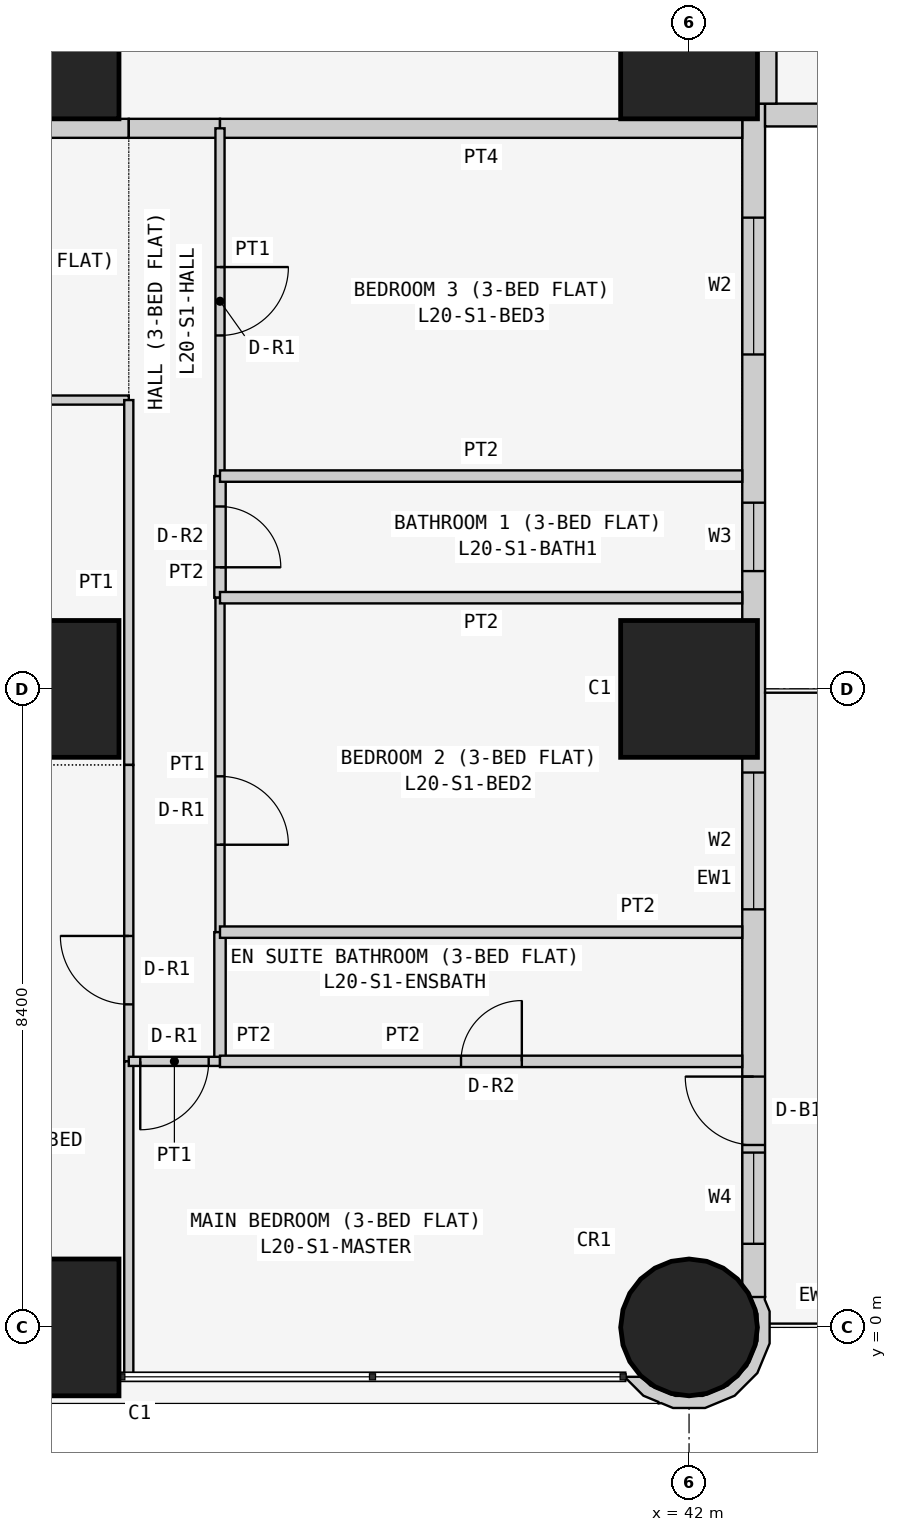
"""IFC4 building model, lengths in metres.
Left out: names, types, materials, properties, quantities, classifications, styles, units other than length and angle.
Written with IfcOpenShell. Run it as: python <this file> out.ifc"""

import sys

from ifc_helpers import new_model, si_unit, direction, frame, frame_2d, origin, origin_2d, place, context, subcontext, project, spatial, polyline, rectangle, circle, outline, extrude, element, fill, save


model = new_model("IFC4")
c1 = context("Model", 3, precision=1e-05, world=origin(), true_north=direction((0.0, 1.0)))
c2 = subcontext(c1, "Body", "Model", "MODEL_VIEW")
j1 = project(units=[si_unit("LENGTHUNIT", "METRE"), si_unit("PLANEANGLEUNIT", "RADIAN")], contexts=[c1])
p1 = place(None, origin())
s1 = spatial("IfcSite", under=j1, at=p1, CompositionType="ELEMENT")
p2 = place(p1, origin())
s2 = spatial("IfcBuilding", under=s1, at=p2, CompositionType="ELEMENT")
p3 = place(p2, frame((0.0, 0.0, 81.3)))
s3 = spatial("IfcBuildingStorey", under=s2, at=p3, CompositionType="ELEMENT", Elevation=81.3)
for number, where, z_axis, x_axis in (
    (1, (33.6, 0.0, 0.0), (0.0, 0.0, 1.0), (1.0, 0.0, 0.0)),
    (2, (33.6, 8.4, 0.0), (0.0, 0.0, 1.0), (1.0, 0.0, 0.0)),
    (3, (33.6, 16.8, 0.0), (0.0, 0.0, 1.0), (1.0, 0.0, 0.0)),
):
    element("IfcColumn", number, at=place(p3, frame(where, z_axis=z_axis, x_axis=x_axis)), inside=s3, PredefinedType="COLUMN", context=c2, shape_type="SweptSolid", body=[
        extrude(rectangle(XDim=1.8, YDim=1.8, at=origin_2d()), origin(), (0.0, 0.0, 1.0), 3.6),
    ])
p4 = place(p3, frame((42.0, 0.0, 0.0), z_axis=(0.0, 0.0, 1.0), x_axis=(1.0, 0.0, 0.0)))
e4 = element("IfcColumn", 4, at=p4, inside=s3, PredefinedType="COLUMN", context=c2, shape_type="SweptSolid", body=[
    extrude(circle(Radius=0.9, at=origin_2d()), origin(), (0.0, 0.0, 1.0), 3.6),
])
for number, where, z_axis, x_axis in (
    (5, (42.0, 8.4, 0.0), (0.0, 0.0, 1.0), (1.0, 0.0, 0.0)),
    (6, (42.0, 16.8, 0.0), (0.0, 0.0, 1.0), (1.0, 0.0, 0.0)),
):
    element("IfcColumn", number, at=place(p3, frame(where, z_axis=z_axis, x_axis=x_axis)), inside=s3, PredefinedType="COLUMN", context=c2, shape_type="SweptSolid", body=[
        extrude(rectangle(XDim=1.8, YDim=1.8, at=origin_2d()), origin(), (0.0, 0.0, 1.0), 3.6),
    ])
p5 = place(p3, frame((42.85, 0.4, 0.0), z_axis=(0.0, 0.0, 1.0), x_axis=(0.0, 1.0, 0.0)))
e7 = element("IfcWall", 7, at=p5, inside=s3, PredefinedType="SOLIDWALL", context=c2, shape_type="SweptSolid", body=[
    extrude(rectangle(XDim=15.7, YDim=0.3, at=frame_2d((7.85, 0.0))), origin(), (0.0, 0.0, 1.0), 3.45),
])
p6 = place(p5, frame((12.4, 0.0, 0.9)))
e8 = element("IfcOpeningElement", 8, at=p6, cuts=e7, PredefinedType="OPENING", context=c2, shape_type="SweptSolid", body=[
    extrude(rectangle(XDim=1.8, YDim=1.5, at=frame_2d((0.9, 0.75))), frame((0.0, 0.16, 0.0), z_axis=(0.0, -1.0, 0.0), x_axis=(1.0, 0.0, 0.0)), (0.0, 0.0, 1.0), 0.32),
])
p7 = place(p5, frame((9.55, 0.0, 1.5)))
e9 = element("IfcOpeningElement", 9, at=p7, cuts=e7, PredefinedType="OPENING", context=c2, shape_type="SweptSolid", body=[
    extrude(rectangle(XDim=0.9, YDim=0.7, at=frame_2d((0.45, 0.35))), frame((0.0, 0.16, 0.0), z_axis=(0.0, -1.0, 0.0), x_axis=(1.0, 0.0, 0.0)), (0.0, 0.0, 1.0), 0.32),
])
p8 = place(p5, frame((5.1, 0.0, 0.9)))
e10 = element("IfcOpeningElement", 10, at=p8, cuts=e7, PredefinedType="OPENING", context=c2, shape_type="SweptSolid", body=[
    extrude(rectangle(XDim=1.8, YDim=1.5, at=frame_2d((0.9, 0.75))), frame((0.0, 0.16, 0.0), z_axis=(0.0, -1.0, 0.0), x_axis=(1.0, 0.0, 0.0)), (0.0, 0.0, 1.0), 0.32),
])
p9 = place(p5, frame((2.0, 0.0, 0.0)))
e11 = element("IfcOpeningElement", 11, at=p9, cuts=e7, PredefinedType="OPENING", context=c2, shape_type="SweptSolid", body=[
    extrude(rectangle(XDim=0.9, YDim=2.4, at=frame_2d((0.45, 1.2))), frame((0.0, 0.16, 0.0), z_axis=(0.0, -1.0, 0.0), x_axis=(1.0, 0.0, 0.0)), (0.0, 0.0, 1.0), 0.32),
])
p10 = place(p5, frame((0.7, 0.0, 0.9)))
e12 = element("IfcOpeningElement", 12, at=p10, cuts=e7, PredefinedType="OPENING", context=c2, shape_type="SweptSolid", body=[
    extrude(rectangle(XDim=1.2, YDim=1.5, at=frame_2d((0.6, 0.75))), frame((0.0, 0.16, 0.0), z_axis=(0.0, -1.0, 0.0), x_axis=(1.0, 0.0, 0.0)), (0.0, 0.0, 1.0), 0.32),
])
p11 = place(p3, frame((43.0, 15.95, 0.0), z_axis=(0.0, 0.0, 1.0), x_axis=(1.0, 0.0, 0.0)))
e13 = element("IfcWall", 13, at=p11, inside=s3, PredefinedType="SOLIDWALL", context=c2, shape_type="SweptSolid", body=[
    extrude(rectangle(XDim=15.4, YDim=0.3, at=frame_2d((7.7, 0.0))), origin(), (0.0, 0.0, 1.0), 3.45),
])
p12 = place(p11, frame((1.2, 0.0, 0.9)))
e14 = element("IfcOpeningElement", 14, at=p12, cuts=e13, PredefinedType="OPENING", context=c2, shape_type="SweptSolid", body=[
    extrude(rectangle(XDim=1.8, YDim=1.5, at=frame_2d((0.9, 0.75))), frame((0.0, 0.16, 0.0), z_axis=(0.0, -1.0, 0.0), x_axis=(1.0, 0.0, 0.0)), (0.0, 0.0, 1.0), 0.32),
])
p13 = place(p11, frame((4.95, 0.0, 1.5)))
e15 = element("IfcOpeningElement", 15, at=p13, cuts=e13, PredefinedType="OPENING", context=c2, shape_type="SweptSolid", body=[
    extrude(rectangle(XDim=0.9, YDim=0.7, at=frame_2d((0.45, 0.35))), frame((0.0, 0.16, 0.0), z_axis=(0.0, -1.0, 0.0), x_axis=(1.0, 0.0, 0.0)), (0.0, 0.0, 1.0), 0.32),
])
p14 = place(p11, frame((8.5, 0.0, 0.9)))
e16 = element("IfcOpeningElement", 16, at=p14, cuts=e13, PredefinedType="OPENING", context=c2, shape_type="SweptSolid", body=[
    extrude(rectangle(XDim=1.8, YDim=1.5, at=frame_2d((0.9, 0.75))), frame((0.0, 0.16, 0.0), z_axis=(0.0, -1.0, 0.0), x_axis=(1.0, 0.0, 0.0)), (0.0, 0.0, 1.0), 0.32),
])
p15 = place(p11, frame((12.5, 0.0, 0.0)))
e17 = element("IfcOpeningElement", 17, at=p15, cuts=e13, PredefinedType="OPENING", context=c2, shape_type="SweptSolid", body=[
    extrude(rectangle(XDim=0.9, YDim=2.4, at=frame_2d((0.45, 1.2))), frame((0.0, 0.16, 0.0), z_axis=(0.0, -1.0, 0.0), x_axis=(1.0, 0.0, 0.0)), (0.0, 0.0, 1.0), 0.32),
])
p16 = place(p11, frame((13.5, 0.0, 0.9)))
e18 = element("IfcOpeningElement", 18, at=p16, cuts=e13, PredefinedType="OPENING", context=c2, shape_type="SweptSolid", body=[
    extrude(rectangle(XDim=1.2, YDim=1.5, at=frame_2d((0.6, 0.75))), frame((0.0, 0.16, 0.0), z_axis=(0.0, -1.0, 0.0), x_axis=(1.0, 0.0, 0.0)), (0.0, 0.0, 1.0), 0.32),
])
p17 = place(p3, frame((41.233, -0.611, 0.0), z_axis=(0.0, 0.0, 1.0), x_axis=(0.377204953059, -0.926129809145, 0.0)))
e19 = element("IfcWall", 19, at=p17, inside=s3, PredefinedType="SOLIDWALL", context=c2, shape_type="SweptSolid", body=[
    extrude(outline(polyline([(0.319, 1.843), (-0.072, 2.001), (-0.24, 2.001), (-0.269, 2.017), (-0.37, 1.841), (-0.102, 1.842), (0.23, 1.707), (0.485, 1.455), (0.624, 1.125), (0.626, 0.766), (0.49, 0.434), (0.239, 0.179), (0.09, 0.117), (0.011, -0.078), (0.024, -0.083), (0.33, 0.045), (0.48, 0.197), (0.499, 0.193), (0.508, 0.225), (0.626, 0.345), (0.785, 0.736), (0.782, 1.157), (0.619, 1.546), (0.319, 1.843)])), origin(), (0.0, 0.0, 1.0), 3.45),
])
p18 = place(p3, frame((43.025, 22.971, 0.0), z_axis=(0.0, 0.0, 1.0), x_axis=(0.0, -1.0, 0.0)))
e20 = element("IfcWall", 20, at=p18, inside=s3, PredefinedType="PARTITIONING", context=c2, shape_type="SweptSolid", body=[
    extrude(rectangle(XDim=6.871, YDim=0.25, at=frame_2d((3.436, 0.0))), origin(), (0.0, 0.0, 1.0), 3.45),
])
p19 = place(p3, frame((34.629, 15.775, 0.0), z_axis=(0.0, 0.0, 1.0), x_axis=(-1.0, 0.0, 0.0)))
e21 = element("IfcWall", 21, at=p19, inside=s3, PredefinedType="PARTITIONING", context=c2, shape_type="SweptSolid", body=[
    extrude(rectangle(XDim=5.229, YDim=0.25, at=frame_2d((2.615, 0.0))), origin(), (0.0, 0.0, 1.0), 3.45),
])
p20 = place(p19, frame((2.129, 0.0, 0.0)))
e22 = element("IfcOpeningElement", 22, at=p20, cuts=e21, PredefinedType="OPENING", context=c2, shape_type="SweptSolid", body=[
    extrude(rectangle(XDim=1.0, YDim=2.1, at=frame_2d((0.5, 1.05))), frame((0.0, 0.135, 0.0), z_axis=(0.0, -1.0, 0.0), x_axis=(1.0, 0.0, 0.0)), (0.0, 0.0, 1.0), 0.27),
])
p21 = place(p3, frame((35.829, 15.775, 0.0), z_axis=(0.0, 0.0, 1.0), x_axis=(-1.0, 0.0, 0.0)))
e23 = element("IfcWall", 23, at=p21, inside=s3, PredefinedType="PARTITIONING", context=c2, shape_type="SweptSolid", body=[
    extrude(rectangle(XDim=1.2, YDim=0.25, at=frame_2d((0.6, 0.0))), origin(), (0.0, 0.0, 1.0), 3.45),
])
p22 = place(p3, frame((42.7, 15.775, 0.0), z_axis=(0.0, 0.0, 1.0), x_axis=(-1.0, 0.0, 0.0)))
e24 = element("IfcWall", 24, at=p22, inside=s3, PredefinedType="PARTITIONING", context=c2, shape_type="SweptSolid", body=[
    extrude(rectangle(XDim=6.871, YDim=0.25, at=frame_2d((3.436, 0.0))), origin(), (0.0, 0.0, 1.0), 3.45),
])
p23 = place(p3, frame((29.4, 12.2, 0.0), z_axis=(0.0, 0.0, 1.0), x_axis=(1.0, 0.0, 0.0)))
e25 = element("IfcWall", 25, at=p23, inside=s3, PredefinedType="PARTITIONING", context=c2, shape_type="SweptSolid", body=[
    extrude(rectangle(XDim=5.229, YDim=0.12, at=frame_2d((2.615, 0.0))), origin(), (0.0, 0.0, 1.0), 3.45),
])
p24 = place(p23, frame((1.05, 0.0, 0.0)))
e26 = element("IfcOpeningElement", 26, at=p24, cuts=e25, PredefinedType="OPENING", context=c2, shape_type="SweptSolid", body=[
    extrude(rectangle(XDim=0.9, YDim=2.1, at=frame_2d((0.45, 1.05))), frame((0.0, 0.07, 0.0), z_axis=(0.0, -1.0, 0.0), x_axis=(1.0, 0.0, 0.0)), (0.0, 0.0, 1.0), 0.14),
])
p25 = place(p3, frame((34.629, 7.4, 0.0), z_axis=(0.0, 0.0, 1.0), x_axis=(0.0, 1.0, 0.0)))
e27 = element("IfcWall", 27, at=p25, inside=s3, PredefinedType="PARTITIONING", context=c2, shape_type="SweptSolid", body=[
    extrude(rectangle(XDim=4.8, YDim=0.12, at=frame_2d((2.4, 0.0))), origin(), (0.0, 0.0, 1.0), 3.45),
])
p26 = place(p3, frame((34.629, 3.5, 0.0), z_axis=(0.0, 0.0, 1.0), x_axis=(0.0, 1.0, 0.0)))
e28 = element("IfcWall", 28, at=p26, inside=s3, PredefinedType="PARTITIONING", context=c2, shape_type="SweptSolid", body=[
    extrude(rectangle(XDim=3.9, YDim=0.12, at=frame_2d((1.95, 0.0))), origin(), (0.0, 0.0, 1.0), 3.45),
])
p27 = place(p26, frame((0.75, 0.0, 0.0)))
e29 = element("IfcOpeningElement", 29, at=p27, cuts=e28, PredefinedType="OPENING", context=c2, shape_type="SweptSolid", body=[
    extrude(rectangle(XDim=0.9, YDim=2.1, at=frame_2d((0.45, 1.05))), frame((0.0, 0.07, 0.0), z_axis=(0.0, -1.0, 0.0), x_axis=(1.0, 0.0, 0.0)), (0.0, 0.0, 1.0), 0.14),
])
p28 = place(p3, frame((34.629, -0.65, 0.0), z_axis=(0.0, 0.0, 1.0), x_axis=(0.0, 1.0, 0.0)))
e30 = element("IfcWall", 30, at=p28, inside=s3, PredefinedType="PARTITIONING", context=c2, shape_type="SweptSolid", body=[
    extrude(rectangle(XDim=4.15, YDim=0.12, at=frame_2d((2.075, 0.0))), origin(), (0.0, 0.0, 1.0), 3.45),
])
p29 = place(p3, frame((35.829, 11.2, 0.0), z_axis=(0.0, 0.0, 1.0), x_axis=(0.0, 1.0, 0.0)))
e31 = element("IfcWall", 31, at=p29, inside=s3, PredefinedType="PARTITIONING", context=c2, shape_type="SweptSolid", body=[
    extrude(rectangle(XDim=4.575, YDim=0.12, at=frame_2d((2.288, 0.0))), origin(), (0.0, 0.0, 1.0), 3.45),
])
p30 = place(p29, frame((1.85, 0.0, 0.0)))
e32 = element("IfcOpeningElement", 32, at=p30, cuts=e31, PredefinedType="OPENING", context=c2, shape_type="SweptSolid", body=[
    extrude(rectangle(XDim=0.9, YDim=2.1, at=frame_2d((0.45, 1.05))), frame((0.0, 0.07, 0.0), z_axis=(0.0, -1.0, 0.0), x_axis=(1.0, 0.0, 0.0)), (0.0, 0.0, 1.0), 0.14),
])
p31 = place(p3, frame((35.829, 9.6, 0.0), z_axis=(0.0, 0.0, 1.0), x_axis=(0.0, 1.0, 0.0)))
e33 = element("IfcWall", 33, at=p31, inside=s3, PredefinedType="PARTITIONING", context=c2, shape_type="SweptSolid", body=[
    extrude(rectangle(XDim=1.6, YDim=0.15, at=frame_2d((0.8, 0.0))), origin(), (0.0, 0.0, 1.0), 3.45),
])
p32 = place(p31, frame((0.4, 0.0, 0.0)))
e34 = element("IfcOpeningElement", 34, at=p32, cuts=e33, PredefinedType="OPENING", context=c2, shape_type="SweptSolid", body=[
    extrude(rectangle(XDim=0.8, YDim=2.1, at=frame_2d((0.4, 1.05))), frame((0.0, 0.085, 0.0), z_axis=(0.0, -1.0, 0.0), x_axis=(1.0, 0.0, 0.0)), (0.0, 0.0, 1.0), 0.17),
])
p33 = place(p3, frame((35.829, 5.2, 0.0), z_axis=(0.0, 0.0, 1.0), x_axis=(0.0, 1.0, 0.0)))
e35 = element("IfcWall", 35, at=p33, inside=s3, PredefinedType="PARTITIONING", context=c2, shape_type="SweptSolid", body=[
    extrude(rectangle(XDim=4.4, YDim=0.12, at=frame_2d((2.2, 0.0))), origin(), (0.0, 0.0, 1.0), 3.45),
])
p34 = place(p33, frame((1.15, 0.0, 0.0)))
e36 = element("IfcOpeningElement", 36, at=p34, cuts=e35, PredefinedType="OPENING", context=c2, shape_type="SweptSolid", body=[
    extrude(rectangle(XDim=0.9, YDim=2.1, at=frame_2d((0.45, 1.05))), frame((0.0, 0.07, 0.0), z_axis=(0.0, -1.0, 0.0), x_axis=(1.0, 0.0, 0.0)), (0.0, 0.0, 1.0), 0.14),
])
p35 = place(p3, frame((35.829, 3.5, 0.0), z_axis=(0.0, 0.0, 1.0), x_axis=(0.0, 1.0, 0.0)))
e37 = element("IfcWall", 37, at=p35, inside=s3, PredefinedType="PARTITIONING", context=c2, shape_type="SweptSolid", body=[
    extrude(rectangle(XDim=1.7, YDim=0.15, at=frame_2d((0.85, 0.0))), origin(), (0.0, 0.0, 1.0), 3.45),
])
p36 = place(p3, frame((34.629, 3.5, 0.0), z_axis=(0.0, 0.0, 1.0), x_axis=(1.0, 0.0, 0.0)))
e38 = element("IfcWall", 38, at=p36, inside=s3, PredefinedType="PARTITIONING", context=c2, shape_type="SweptSolid", body=[
    extrude(rectangle(XDim=1.2, YDim=0.12, at=frame_2d((0.6, 0.0))), origin(), (0.0, 0.0, 1.0), 3.45),
])
p37 = place(p36, frame((0.151, 0.0, 0.0)))
e39 = element("IfcOpeningElement", 39, at=p37, cuts=e38, PredefinedType="OPENING", context=c2, shape_type="SweptSolid", body=[
    extrude(rectangle(XDim=0.9, YDim=2.1, at=frame_2d((0.45, 1.05))), frame((0.0, 0.07, 0.0), z_axis=(0.0, -1.0, 0.0), x_axis=(1.0, 0.0, 0.0)), (0.0, 0.0, 1.0), 0.14),
])
for number, where, z_axis, x_axis in (
    (40, (35.829, 11.2, 0.0), (0.0, 0.0, 1.0), (1.0, 0.0, 0.0)),
    (41, (35.829, 9.6, 0.0), (0.0, 0.0, 1.0), (1.0, 0.0, 0.0)),
    (42, (35.829, 5.2, 0.0), (0.0, 0.0, 1.0), (1.0, 0.0, 0.0)),
):
    element("IfcWall", number, at=place(p3, frame(where, z_axis=z_axis, x_axis=x_axis)), inside=s3, PredefinedType="PARTITIONING", context=c2, shape_type="SweptSolid", body=[
        extrude(rectangle(XDim=6.871, YDim=0.15, at=frame_2d((3.436, 0.0))), origin(), (0.0, 0.0, 1.0), 3.45),
    ])
p38 = place(p3, frame((35.829, 3.5, 0.0), z_axis=(0.0, 0.0, 1.0), x_axis=(1.0, 0.0, 0.0)))
e43 = element("IfcWall", 43, at=p38, inside=s3, PredefinedType="PARTITIONING", context=c2, shape_type="SweptSolid", body=[
    extrude(rectangle(XDim=6.871, YDim=0.15, at=frame_2d((3.436, 0.0))), origin(), (0.0, 0.0, 1.0), 3.45),
])
p39 = place(p38, frame((3.171, 0.0, 0.0)))
e44 = element("IfcOpeningElement", 44, at=p39, cuts=e43, PredefinedType="OPENING", context=c2, shape_type="SweptSolid", body=[
    extrude(rectangle(XDim=0.8, YDim=2.1, at=frame_2d((0.4, 1.05))), frame((0.0, 0.085, 0.0), z_axis=(0.0, -1.0, 0.0), x_axis=(1.0, 0.0, 0.0)), (0.0, 0.0, 1.0), 0.17),
])
p40 = place(p6, origin())
e45 = element("IfcWindow", 45, at=p40, inside=s3, PartitioningType="SINGLE_PANEL", PredefinedType="WINDOW", context=c2, shape_type="SweptSolid", body=[
    extrude(rectangle(XDim=1.8, YDim=1.5, at=frame_2d((0.9, 0.75))), frame((0.0, 0.03, 0.0), z_axis=(0.0, -1.0, 0.0), x_axis=(1.0, 0.0, 0.0)), (0.0, 0.0, 1.0), 0.06),
])
fill(e8, e45)
p41 = place(p7, origin())
e46 = element("IfcWindow", 46, at=p41, inside=s3, PartitioningType="SINGLE_PANEL", PredefinedType="WINDOW", context=c2, shape_type="SweptSolid", body=[
    extrude(rectangle(XDim=0.9, YDim=0.7, at=frame_2d((0.45, 0.35))), frame((0.0, 0.03, 0.0), z_axis=(0.0, -1.0, 0.0), x_axis=(1.0, 0.0, 0.0)), (0.0, 0.0, 1.0), 0.06),
])
fill(e9, e46)
p42 = place(p8, origin())
e47 = element("IfcWindow", 47, at=p42, inside=s3, PartitioningType="SINGLE_PANEL", PredefinedType="WINDOW", context=c2, shape_type="SweptSolid", body=[
    extrude(rectangle(XDim=1.8, YDim=1.5, at=frame_2d((0.9, 0.75))), frame((0.0, 0.03, 0.0), z_axis=(0.0, -1.0, 0.0), x_axis=(1.0, 0.0, 0.0)), (0.0, 0.0, 1.0), 0.06),
])
fill(e10, e47)
p43 = place(p9, origin())
e48 = element("IfcDoor", 48, at=p43, inside=s3, OperationType="SINGLE_SWING_RIGHT", PredefinedType="DOOR", context=c2, shape_type="SweptSolid", body=[
    extrude(rectangle(XDim=0.9, YDim=2.4, at=frame_2d((0.45, 1.2))), frame((0.0, 0.025, 0.0), z_axis=(0.0, -1.0, 0.0), x_axis=(1.0, 0.0, 0.0)), (0.0, 0.0, 1.0), 0.05),
])
fill(e11, e48)
p44 = place(p10, origin())
e49 = element("IfcWindow", 49, at=p44, inside=s3, PartitioningType="SINGLE_PANEL", PredefinedType="WINDOW", context=c2, shape_type="SweptSolid", body=[
    extrude(rectangle(XDim=1.2, YDim=1.5, at=frame_2d((0.6, 0.75))), frame((0.0, 0.03, 0.0), z_axis=(0.0, -1.0, 0.0), x_axis=(1.0, 0.0, 0.0)), (0.0, 0.0, 1.0), 0.06),
])
fill(e12, e49)
p45 = place(p27, origin())
e50 = element("IfcDoor", 50, at=p45, inside=s3, OperationType="SINGLE_SWING_RIGHT", PredefinedType="DOOR", context=c2, shape_type="SweptSolid", body=[
    extrude(rectangle(XDim=0.9, YDim=2.1, at=frame_2d((0.45, 1.05))), frame((0.0, 0.025, 0.0), z_axis=(0.0, -1.0, 0.0), x_axis=(1.0, 0.0, 0.0)), (0.0, 0.0, 1.0), 0.05),
])
fill(e29, e50)
p46 = place(p30, frame((0.9, 0.0, 0.0), z_axis=(0.0, 0.0, 1.0), x_axis=(-1.0, 0.0, 0.0)))
e51 = element("IfcDoor", 51, at=p46, inside=s3, OperationType="SINGLE_SWING_LEFT", PredefinedType="DOOR", context=c2, shape_type="SweptSolid", body=[
    extrude(rectangle(XDim=0.9, YDim=2.1, at=frame_2d((0.45, 1.05))), frame((0.0, 0.025, 0.0), z_axis=(0.0, -1.0, 0.0), x_axis=(1.0, 0.0, 0.0)), (0.0, 0.0, 1.0), 0.05),
])
fill(e32, e51)
p47 = place(p32, frame((0.8, 0.0, 0.0), z_axis=(0.0, 0.0, 1.0), x_axis=(-1.0, 0.0, 0.0)))
e52 = element("IfcDoor", 52, at=p47, inside=s3, OperationType="SINGLE_SWING_RIGHT", PredefinedType="DOOR", context=c2, shape_type="SweptSolid", body=[
    extrude(rectangle(XDim=0.8, YDim=2.1, at=frame_2d((0.4, 1.05))), frame((0.0, 0.025, 0.0), z_axis=(0.0, -1.0, 0.0), x_axis=(1.0, 0.0, 0.0)), (0.0, 0.0, 1.0), 0.05),
])
fill(e34, e52)
p48 = place(p34, frame((0.9, 0.0, 0.0), z_axis=(0.0, 0.0, 1.0), x_axis=(-1.0, 0.0, 0.0)))
e53 = element("IfcDoor", 53, at=p48, inside=s3, OperationType="SINGLE_SWING_RIGHT", PredefinedType="DOOR", context=c2, shape_type="SweptSolid", body=[
    extrude(rectangle(XDim=0.9, YDim=2.1, at=frame_2d((0.45, 1.05))), frame((0.0, 0.025, 0.0), z_axis=(0.0, -1.0, 0.0), x_axis=(1.0, 0.0, 0.0)), (0.0, 0.0, 1.0), 0.05),
])
fill(e36, e53)
p49 = place(p37, frame((0.9, 0.0, 0.0), z_axis=(0.0, 0.0, 1.0), x_axis=(-1.0, 0.0, 0.0)))
e54 = element("IfcDoor", 54, at=p49, inside=s3, OperationType="SINGLE_SWING_RIGHT", PredefinedType="DOOR", context=c2, shape_type="SweptSolid", body=[
    extrude(rectangle(XDim=0.9, YDim=2.1, at=frame_2d((0.45, 1.05))), frame((0.0, 0.025, 0.0), z_axis=(0.0, -1.0, 0.0), x_axis=(1.0, 0.0, 0.0)), (0.0, 0.0, 1.0), 0.05),
])
fill(e39, e54)
p50 = place(p39, origin())
e55 = element("IfcDoor", 55, at=p50, inside=s3, OperationType="SINGLE_SWING_RIGHT", PredefinedType="DOOR", context=c2, shape_type="SweptSolid", body=[
    extrude(rectangle(XDim=0.8, YDim=2.1, at=frame_2d((0.4, 1.05))), frame((0.0, 0.025, 0.0), z_axis=(0.0, -1.0, 0.0), x_axis=(1.0, 0.0, 0.0)), (0.0, 0.0, 1.0), 0.05),
])
fill(e44, e55)
save(model, sys.argv[1])
